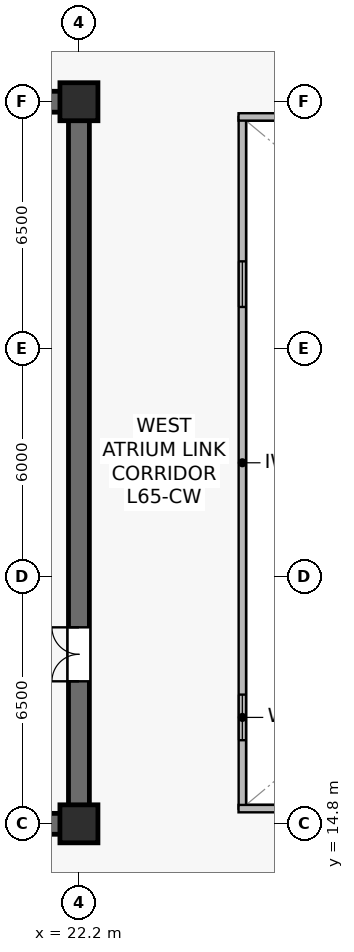
"""IFC4 building model, lengths in metres.
Left out: names, types, materials, properties, quantities, classifications, styles, units other than length and angle.
Written with IfcOpenShell. Run it as: python <this file> out.ifc"""

import sys

from ifc_helpers import new_model, si_unit, direction, frame, frame_2d, origin, origin_2d, place, context, subcontext, project, spatial, rectangle, extrude, source, transform, mapped, element, fill, save


model = new_model("IFC4")
c1 = context("Model", 3, precision=1e-05, world=origin(), true_north=direction((0.0, 1.0)))
c2 = subcontext(c1, "Body", "Model", "MODEL_VIEW")
j1 = project(units=[si_unit("LENGTHUNIT", "METRE"), si_unit("PLANEANGLEUNIT", "RADIAN")], contexts=[c1])
p1 = place(None, origin())
s1 = spatial("IfcSite", under=j1, at=p1, CompositionType="ELEMENT")
p2 = place(p1, origin())
s2 = spatial("IfcBuilding", under=s1, at=p2, CompositionType="ELEMENT")
p3 = place(p2, frame((0.0, 0.0, 271.1)))
s3 = spatial("IfcBuildingStorey", under=s2, at=p3, CompositionType="ELEMENT", Elevation=271.1)
p4 = place(p3, frame((7.125, 14.8, 0.0), z_axis=(0.0, 0.0, 1.0), x_axis=(1.0, 0.0, 0.0)))
e1 = element("IfcWall", 1, at=p4, inside=s3, PredefinedType="SHEAR", context=c2, shape_type="SweptSolid", body=[
    extrude(rectangle(XDim=15.35, YDim=0.55, at=frame_2d((7.675, 0.0))), origin(), (0.0, 0.0, 1.0), 3.8),
])
p5 = place(p3, frame((7.125, 33.8, 0.0), z_axis=(0.0, 0.0, 1.0), x_axis=(1.0, 0.0, 0.0)))
e2 = element("IfcWall", 2, at=p5, inside=s3, PredefinedType="SHEAR", context=c2, shape_type="SweptSolid", body=[
    extrude(rectangle(XDim=15.35, YDim=0.55, at=frame_2d((7.675, 0.0))), origin(), (0.0, 0.0, 1.0), 3.8),
])
p6 = place(p5, frame((5.625, 0.0, 0.0)))
e3 = element("IfcOpeningElement", 3, at=p6, cuts=e2, PredefinedType="OPENING", context=c2, shape_type="SweptSolid", body=[
    extrude(rectangle(XDim=0.95, YDim=2.15, at=frame_2d((0.475, 1.075))), frame((0.0, 0.285, 0.0), z_axis=(0.0, -1.0, 0.0), x_axis=(1.0, 0.0, 0.0)), (0.0, 0.0, 1.0), 0.57),
])
p7 = place(p5, frame((8.99, 0.0, 0.0)))
e4 = element("IfcOpeningElement", 4, at=p7, cuts=e2, PredefinedType="OPENING", context=c2, shape_type="SweptSolid", body=[
    extrude(rectangle(XDim=0.95, YDim=2.15, at=frame_2d((0.475, 1.075))), frame((0.0, 0.285, 0.0), z_axis=(0.0, -1.0, 0.0), x_axis=(1.0, 0.0, 0.0)), (0.0, 0.0, 1.0), 0.57),
])
p8 = place(p5, frame((12.39, 0.0, 0.0)))
e5 = element("IfcOpeningElement", 5, at=p8, cuts=e2, PredefinedType="OPENING", context=c2, shape_type="SweptSolid", body=[
    extrude(rectangle(XDim=0.95, YDim=2.15, at=frame_2d((0.475, 1.075))), frame((0.0, 0.285, 0.0), z_axis=(0.0, -1.0, 0.0), x_axis=(1.0, 0.0, 0.0)), (0.0, 0.0, 1.0), 0.57),
])
p9 = place(p3, frame((22.2, 15.075, 0.0), z_axis=(0.0, 0.0, 1.0), x_axis=(0.0, 1.0, 0.0)))
e6 = element("IfcWall", 6, at=p9, inside=s3, PredefinedType="SHEAR", context=c2, shape_type="SweptSolid", body=[
    extrude(rectangle(XDim=18.45, YDim=0.55, at=frame_2d((9.225, 0.0))), origin(), (0.0, 0.0, 1.0), 3.8),
])
p10 = place(p9, frame((3.475, 0.0, 0.0)))
e7 = element("IfcOpeningElement", 7, at=p10, cuts=e6, PredefinedType="OPENING", context=c2, shape_type="SweptSolid", body=[
    extrude(rectangle(XDim=1.42, YDim=2.2, at=frame_2d((0.71, 1.1))), frame((0.0, 0.285, 0.0), z_axis=(0.0, -1.0, 0.0), x_axis=(1.0, 0.0, 0.0)), (0.0, 0.0, 1.0), 0.57),
])
m1 = source(origin(), c2, "Body", "SweptSolid", [
    extrude(rectangle(XDim=1.0, YDim=1.0, at=origin_2d()), origin(), (0.0, 0.0, 1.0), 4.1),
])
for number, where, z_axis, x_axis in (
    (8, (22.2, 14.8, 0.0), (0.0, 0.0, 1.0), (1.0, 0.0, 0.0)),
    (9, (22.2, 33.8, 0.0), (0.0, 0.0, 1.0), (1.0, 0.0, 0.0)),
):
    element("IfcColumn", number, at=place(p3, frame(where, z_axis=z_axis, x_axis=x_axis)), inside=s3, PredefinedType="COLUMN", context=c2, shape_type="MappedRepresentation", body=[
        mapped(m1, transform((0.0, 0.0, 0.0), scale=1.0)),
    ])
p11 = place(p3, frame((26.5, 15.2, 0.0), z_axis=(0.0, 0.0, 1.0), x_axis=(0.0, 1.0, 0.0)))
e10 = element("IfcWall", 10, at=p11, inside=s3, PredefinedType="SOLIDWALL", context=c2, shape_type="SweptSolid", body=[
    extrude(rectangle(XDim=18.2, YDim=0.195, at=frame_2d((9.1, 0.0))), origin(), (0.0, 0.0, 1.0), 3.8),
])
p12 = place(p11, frame((1.8, 0.0, 0.9)))
e11 = element("IfcOpeningElement", 11, at=p12, cuts=e10, PredefinedType="OPENING", context=c2, shape_type="SweptSolid", body=[
    extrude(rectangle(XDim=1.2, YDim=1.35, at=frame_2d((0.6, 0.675))), frame((0.0, 0.107, 0.0), z_axis=(0.0, -1.0, 0.0), x_axis=(1.0, 0.0, 0.0)), (0.0, 0.0, 1.0), 0.215),
])
p13 = place(p11, frame((13.2, 0.0, 0.9)))
e12 = element("IfcOpeningElement", 12, at=p13, cuts=e10, PredefinedType="OPENING", context=c2, shape_type="SweptSolid", body=[
    extrude(rectangle(XDim=1.2, YDim=1.35, at=frame_2d((0.6, 0.675))), frame((0.0, 0.107, 0.0), z_axis=(0.0, -1.0, 0.0), x_axis=(1.0, 0.0, 0.0)), (0.0, 0.0, 1.0), 0.215),
])
for number, where, z_axis, x_axis in (
    (13, (26.4, 15.2, 0.0), (0.0, 0.0, 1.0), (1.0, 0.0, 0.0)),
    (14, (26.4, 33.4, 0.0), (0.0, 0.0, 1.0), (1.0, 0.0, 0.0)),
):
    element("IfcWall", number, at=place(p3, frame(where, z_axis=z_axis, x_axis=x_axis)), inside=s3, PredefinedType="SOLIDWALL", context=c2, shape_type="SweptSolid", body=[
        extrude(rectangle(XDim=22.0, YDim=0.195, at=frame_2d((11.0, 0.0))), origin(), (0.0, 0.0, 1.0), 3.8),
    ])
m2 = source(origin(), c2, "Body", "SweptSolid", [
    extrude(rectangle(XDim=1.2, YDim=1.35, at=frame_2d((0.6, 0.675))), frame((0.0, 0.03, 0.0), z_axis=(0.0, -1.0, 0.0), x_axis=(1.0, 0.0, 0.0)), (0.0, 0.0, 1.0), 0.06),
])
p14 = place(p12, origin())
e15 = element("IfcWindow", 15, at=p14, inside=s3, PartitioningType="SINGLE_PANEL", PredefinedType="WINDOW", context=c2, shape_type="MappedRepresentation", body=[
    mapped(m2, transform((0.0, 0.0, 0.0), scale=1.0)),
])
fill(e11, e15)
p15 = place(p13, origin())
e16 = element("IfcWindow", 16, at=p15, inside=s3, PartitioningType="SINGLE_PANEL", PredefinedType="WINDOW", context=c2, shape_type="MappedRepresentation", body=[
    mapped(m2, transform((0.0, 0.0, 0.0), scale=1.0)),
])
fill(e12, e16)
m3 = source(origin(), c2, "Body", "SweptSolid", [
    extrude(rectangle(XDim=1.42, YDim=2.2, at=frame_2d((0.71, 1.1))), frame((0.0, 0.025, 0.0), z_axis=(0.0, -1.0, 0.0), x_axis=(1.0, 0.0, 0.0)), (0.0, 0.0, 1.0), 0.05),
])
p16 = place(p10, origin())
e17 = element("IfcDoor", 17, at=p16, inside=s3, OperationType="DOUBLE_DOOR_SINGLE_SWING", PredefinedType="DOOR", context=c2, shape_type="MappedRepresentation", body=[
    mapped(m3, transform((0.0, 0.0, 0.0), scale=1.0)),
])
fill(e7, e17)
save(model, sys.argv[1])
